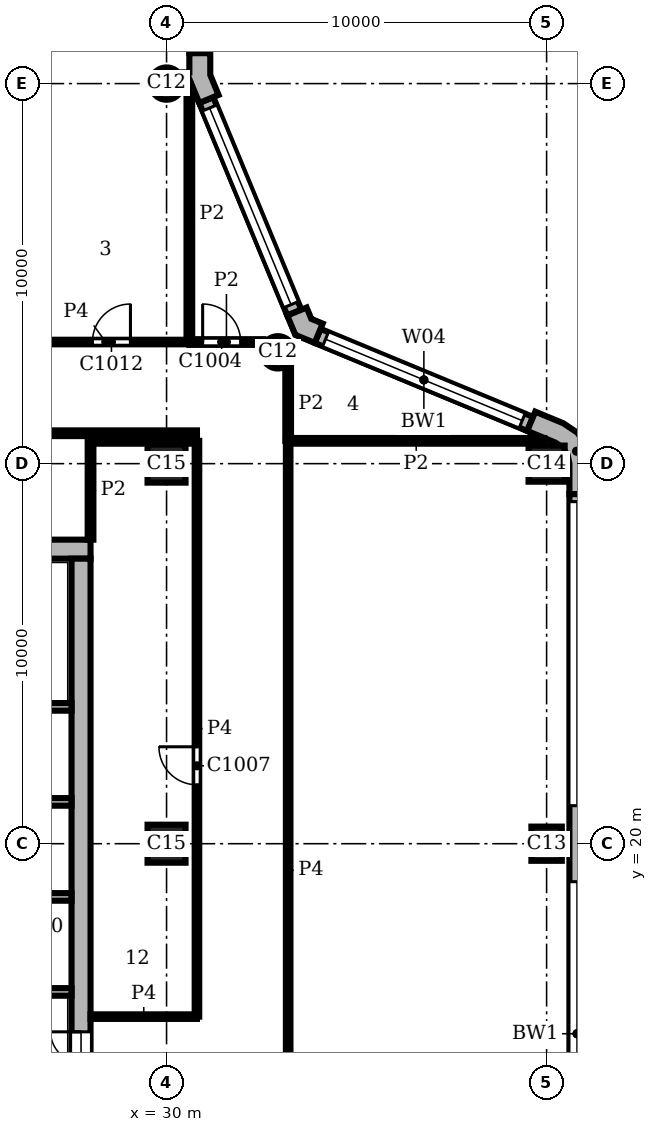
"""IFC4 building model, lengths in metres.
Left out: names, types, materials, properties, quantities, classifications, styles, units other than length and angle.
Written with IfcOpenShell. Run it as: python <this file> out.ifc"""

import sys

from ifc_helpers import new_model, si_unit, direction, frame, frame_2d, origin, origin_2d, place, context, subcontext, project, spatial, polyline, rectangle, circle, outline, extrude, element, fill, save


model = new_model("IFC4")
c1 = context("Model", 3, precision=1e-05, world=origin(), true_north=direction((0.0, 1.0)))
c2 = subcontext(c1, "Body", "Model", "MODEL_VIEW")
j1 = project(units=[si_unit("LENGTHUNIT", "METRE"), si_unit("PLANEANGLEUNIT", "RADIAN")], contexts=[c1])
p1 = place(None, origin())
s1 = spatial("IfcSite", under=j1, at=p1, CompositionType="ELEMENT")
p2 = place(p1, origin())
s2 = spatial("IfcBuilding", under=s1, at=p2, CompositionType="ELEMENT")
p3 = place(p2, frame((0.0, 0.0, 341.1)))
s3 = spatial("IfcBuildingStorey", under=s2, at=p3, CompositionType="ELEMENT", Elevation=341.1)
p4 = place(p3, frame((40.0, 20.0, 0.0), z_axis=(0.0, 0.0, 1.0), x_axis=(0.0, 1.0, 0.0)))
e1 = element("IfcColumn", 1, at=p4, inside=s3, PredefinedType="COLUMN", context=c2, shape_type="SweptSolid", body=[
    extrude(rectangle(XDim=0.9, YDim=0.8, at=origin_2d()), origin(), (0.0, 0.0, 1.0), 3.9),
])
p5 = place(p3, frame((40.0, 30.0, 0.0), z_axis=(0.0, 0.0, 1.0), x_axis=(1.0, 0.0, 0.0)))
e2 = element("IfcColumn", 2, at=p5, inside=s3, PredefinedType="COLUMN", context=c2, shape_type="SweptSolid", body=[
    extrude(rectangle(XDim=0.95, YDim=0.95, at=origin_2d()), origin(), (0.0, 0.0, 1.0), 3.9),
])
for number, where, z_axis, x_axis in (
    (3, (32.929, 32.929, 0.0), (0.0, 0.0, 1.0), (1.0, 0.0, 0.0)),
    (4, (30.0, 40.0, 0.0), (0.0, 0.0, 1.0), (1.0, 0.0, 0.0)),
):
    element("IfcColumn", number, at=place(p3, frame(where, z_axis=z_axis, x_axis=x_axis)), inside=s3, PredefinedType="COLUMN", context=c2, shape_type="SweptSolid", body=[
        extrude(circle(Radius=0.425, at=origin_2d()), origin(), (0.0, 0.0, 1.0), 3.9),
    ])
for number, where, z_axis, x_axis in (
    (5, (30.0, 20.0, 0.0), (0.0, 0.0, 1.0), (1.0, 0.0, 0.0)),
    (6, (30.0, 30.0, 0.0), (0.0, 0.0, 1.0), (1.0, 0.0, 0.0)),
):
    element("IfcColumn", number, at=place(p3, frame(where, z_axis=z_axis, x_axis=x_axis)), inside=s3, PredefinedType="COLUMN", context=c2, shape_type="SweptSolid", body=[
        extrude(rectangle(XDim=1.0, YDim=1.0, at=origin_2d()), origin(), (0.0, 0.0, 1.0), 3.9),
    ])
p6 = place(p3, frame((27.75, 8.5, 0.0), z_axis=(0.0, 0.0, 1.0), x_axis=(0.0, 1.0, 0.0)))
e7 = element("IfcWall", 7, at=p6, inside=s3, PredefinedType="SHEAR", context=c2, shape_type="SweptSolid", body=[
    extrude(rectangle(XDim=19.0, YDim=0.5, at=frame_2d((9.5, 0.0))), origin(), (0.0, 0.0, 1.0), 3.9),
])
p7 = place(p6, frame((4.95, 0.0, 0.0)))
e8 = element("IfcOpeningElement", 8, at=p7, cuts=e7, PredefinedType="OPENING", context=c2, shape_type="SweptSolid", body=[
    extrude(rectangle(XDim=1.6, YDim=2.1, at=frame_2d((0.8, 1.05))), frame((0.0, 0.26, 0.0), z_axis=(0.0, -1.0, 0.0), x_axis=(1.0, 0.0, 0.0)), (0.0, 0.0, 1.0), 0.52),
])
p8 = place(p3, frame((28.0, 27.75, 0.0), z_axis=(0.0, 0.0, 1.0), x_axis=(-1.0, 0.0, 0.0)))
e9 = element("IfcWall", 9, at=p8, inside=s3, PredefinedType="SHEAR", context=c2, shape_type="SweptSolid", body=[
    extrude(rectangle(XDim=20.0, YDim=0.5, at=frame_2d((10.0, 0.0))), origin(), (0.0, 0.0, 1.0), 3.9),
])
p9 = place(p3, origin())
e10 = element("IfcWall", 10, at=p9, inside=s3, PredefinedType="SOLIDWALL", context=c2, shape_type="SweptSolid", body=[
    extrude(outline(polyline([(41.0, 29.2), (41.15, 29.2), (41.15, 30.0), (41.062, 30.44), (40.813, 30.813), (40.44, 31.062), (39.701, 31.369), (39.644, 31.23), (39.49, 30.861), (40.229, 30.554), (40.424, 30.424), (40.554, 30.229), (40.6, 30.0), (40.6, 29.2), (41.0, 29.2)])), origin(), (0.0, 0.0, 1.0), 3.9),
])
e11 = element("IfcWall", 11, at=p9, inside=s3, PredefinedType="SOLIDWALL", context=c2, shape_type="SweptSolid", body=[
    extrude(outline(polyline([(34.051, 33.547), (34.108, 33.685), (33.809, 33.809), (33.685, 34.108), (33.547, 34.051), (33.177, 33.898), (33.388, 33.388), (33.898, 33.177), (34.051, 33.547)])), origin(), (0.0, 0.0, 1.0), 3.9),
])
e12 = element("IfcWall", 12, at=p9, inside=s3, PredefinedType="SOLIDWALL", context=c2, shape_type="SweptSolid", body=[
    extrude(outline(polyline([(30.62, 39.995), (30.62, 40.071), (30.861, 39.49), (31.23, 39.644), (31.369, 39.701), (31.15, 40.229), (31.15, 40.8), (31.0, 40.8), (30.6, 40.8), (30.6, 40.295), (30.425, 40.295), (30.425, 39.995), (30.62, 39.995)])), origin(), (0.0, 0.0, 1.0), 3.9),
])
p10 = place(p3, frame((40.8, 0.8, 0.0), z_axis=(0.0, 0.0, 1.0), x_axis=(0.0, 1.0, 0.0)))
e13 = element("IfcWall", 13, at=p10, inside=s3, PredefinedType="SOLIDWALL", context=c2, shape_type="SweptSolid", body=[
    extrude(rectangle(XDim=28.4, YDim=0.4, at=frame_2d((14.2, 0.0))), origin(), (0.0, 0.0, 1.0), 3.9),
])
p11 = place(p10, frame((0.2, 0.0, 0.9)))
e14 = element("IfcOpeningElement", 14, at=p11, cuts=e13, PredefinedType="OPENING", context=c2, shape_type="SweptSolid", body=[
    extrude(rectangle(XDim=8.0, YDim=2.35, at=frame_2d((4.0, 1.175))), frame((0.0, 0.21, 0.0), z_axis=(0.0, -1.0, 0.0), x_axis=(1.0, 0.0, 0.0)), (0.0, 0.0, 1.0), 0.42),
])
p12 = place(p10, frame((10.2, 0.0, 0.9)))
e15 = element("IfcOpeningElement", 15, at=p12, cuts=e13, PredefinedType="OPENING", context=c2, shape_type="SweptSolid", body=[
    extrude(rectangle(XDim=8.0, YDim=2.35, at=frame_2d((4.0, 1.175))), frame((0.0, 0.21, 0.0), z_axis=(0.0, -1.0, 0.0), x_axis=(1.0, 0.0, 0.0)), (0.0, 0.0, 1.0), 0.42),
])
p13 = place(p10, frame((20.2, 0.0, 0.9)))
e16 = element("IfcOpeningElement", 16, at=p13, cuts=e13, PredefinedType="OPENING", context=c2, shape_type="SweptSolid", body=[
    extrude(rectangle(XDim=8.0, YDim=2.35, at=frame_2d((4.0, 1.175))), frame((0.0, 0.21, 0.0), z_axis=(0.0, -1.0, 0.0), x_axis=(1.0, 0.0, 0.0)), (0.0, 0.0, 1.0), 0.42),
])
p14 = place(p3, frame((39.567, 31.045, 0.0), z_axis=(0.0, 0.0, 1.0), x_axis=(-0.923891000409, 0.382655745237, 0.0)))
e17 = element("IfcWall", 17, at=p14, inside=s3, PredefinedType="SOLIDWALL", context=c2, shape_type="SweptSolid", body=[
    extrude(rectangle(XDim=6.053, YDim=0.4, at=frame_2d((3.027, 0.0))), origin(), (0.0, 0.0, 1.0), 3.9),
])
p15 = place(p14, frame((0.227, 0.0, 0.9)))
e18 = element("IfcOpeningElement", 18, at=p15, cuts=e17, PredefinedType="OPENING", context=c2, shape_type="SweptSolid", body=[
    extrude(rectangle(XDim=5.6, YDim=2.35, at=frame_2d((2.8, 1.175))), frame((0.0, 0.21, 0.0), z_axis=(0.0, -1.0, 0.0), x_axis=(1.0, 0.0, 0.0)), (0.0, 0.0, 1.0), 0.42),
])
p16 = place(p3, frame((33.362, 33.974, 0.0), z_axis=(0.0, 0.0, 1.0), x_axis=(-0.382655745237, 0.923891000409, 0.0)))
e19 = element("IfcWall", 19, at=p16, inside=s3, PredefinedType="SOLIDWALL", context=c2, shape_type="SweptSolid", body=[
    extrude(rectangle(XDim=6.053, YDim=0.4, at=frame_2d((3.027, 0.0))), origin(), (0.0, 0.0, 1.0), 3.9),
])
p17 = place(p16, frame((0.227, 0.0, 0.9)))
e20 = element("IfcOpeningElement", 20, at=p17, cuts=e19, PredefinedType="OPENING", context=c2, shape_type="SweptSolid", body=[
    extrude(rectangle(XDim=5.6, YDim=2.35, at=frame_2d((2.8, 1.175))), frame((0.0, 0.21, 0.0), z_axis=(0.0, -1.0, 0.0), x_axis=(1.0, 0.0, 0.0)), (0.0, 0.0, 1.0), 0.42),
])
p18 = place(p3, frame((30.8, 40.8, 0.0), z_axis=(0.0, 0.0, 1.0), x_axis=(0.0, 1.0, 0.0)))
e21 = element("IfcWall", 21, at=p18, inside=s3, PredefinedType="SOLIDWALL", context=c2, shape_type="SweptSolid", body=[
    extrude(rectangle(XDim=18.4, YDim=0.4, at=frame_2d((9.2, 0.0))), origin(), (0.0, 0.0, 1.0), 3.9),
])
p19 = place(p18, frame((0.2, 0.0, 0.9)))
e22 = element("IfcOpeningElement", 22, at=p19, cuts=e21, PredefinedType="OPENING", context=c2, shape_type="SweptSolid", body=[
    extrude(rectangle(XDim=8.0, YDim=2.35, at=frame_2d((4.0, 1.175))), frame((0.0, 0.21, 0.0), z_axis=(0.0, -1.0, 0.0), x_axis=(1.0, 0.0, 0.0)), (0.0, 0.0, 1.0), 0.42),
])
p20 = place(p18, frame((10.2, 0.0, 0.9)))
e23 = element("IfcOpeningElement", 23, at=p20, cuts=e21, PredefinedType="OPENING", context=c2, shape_type="SweptSolid", body=[
    extrude(rectangle(XDim=8.0, YDim=2.35, at=frame_2d((4.0, 1.175))), frame((0.0, 0.21, 0.0), z_axis=(0.0, -1.0, 0.0), x_axis=(1.0, 0.0, 0.0)), (0.0, 0.0, 1.0), 0.42),
])
for number, where, z_axis, x_axis in (
    (24, (24.3, 16.1, 0.0), (0.0, 0.0, 1.0), (1.0, 0.0, 0.0)),
    (25, (24.3, 18.6, 0.0), (0.0, 0.0, 1.0), (1.0, 0.0, 0.0)),
    (26, (24.3, 21.1, 0.0), (0.0, 0.0, 1.0), (1.0, 0.0, 0.0)),
):
    element("IfcWall", number, at=place(p3, frame(where, z_axis=z_axis, x_axis=x_axis)), inside=s3, PredefinedType="SHEAR", context=c2, shape_type="SweptSolid", body=[
        extrude(rectangle(XDim=3.2, YDim=0.2, at=frame_2d((1.6, 0.0))), origin(), (0.0, 0.0, 1.0), 3.58),
    ])
p21 = place(p3, frame((13.8, 23.6, 0.0), z_axis=(0.0, 0.0, 1.0), x_axis=(1.0, 0.0, 0.0)))
e27 = element("IfcWall", 27, at=p21, inside=s3, PredefinedType="SHEAR", context=c2, shape_type="SweptSolid", body=[
    extrude(rectangle(XDim=13.7, YDim=0.2, at=frame_2d((6.85, 0.0))), origin(), (0.0, 0.0, 1.0), 3.58),
])
p22 = place(p21, frame((2.4, 0.0, 0.0)))
e28 = element("IfcOpeningElement", 28, at=p22, cuts=e27, PredefinedType="OPENING", context=c2, shape_type="SweptSolid", body=[
    extrude(rectangle(XDim=1.1, YDim=2.1, at=frame_2d((0.55, 1.05))), frame((0.0, 0.11, 0.0), z_axis=(0.0, -1.0, 0.0), x_axis=(1.0, 0.0, 0.0)), (0.0, 0.0, 1.0), 0.22),
])
p23 = place(p21, frame((4.9, 0.0, 0.0)))
e29 = element("IfcOpeningElement", 29, at=p23, cuts=e27, PredefinedType="OPENING", context=c2, shape_type="SweptSolid", body=[
    extrude(rectangle(XDim=1.1, YDim=2.1, at=frame_2d((0.55, 1.05))), frame((0.0, 0.11, 0.0), z_axis=(0.0, -1.0, 0.0), x_axis=(1.0, 0.0, 0.0)), (0.0, 0.0, 1.0), 0.22),
])
p24 = place(p21, frame((0.15, 0.0, 0.0)))
e30 = element("IfcOpeningElement", 30, at=p24, cuts=e27, PredefinedType="OPENING", context=c2, shape_type="SweptSolid", body=[
    extrude(rectangle(XDim=1.0, YDim=2.1, at=frame_2d((0.5, 1.05))), frame((0.0, 0.11, 0.0), z_axis=(0.0, -1.0, 0.0), x_axis=(1.0, 0.0, 0.0)), (0.0, 0.0, 1.0), 0.22),
])
p25 = place(p3, frame((28.0, 28.0, 0.0), z_axis=(0.0, 0.0, 1.0), x_axis=(0.0, 1.0, 0.0)))
e31 = element("IfcWall", 31, at=p25, inside=s3, PredefinedType="PARTITIONING", context=c2, shape_type="SweptSolid", body=[
    extrude(rectangle(XDim=2.598, YDim=0.15, at=frame_2d((1.299, 0.0))), origin(), (0.0, 0.0, 1.0), 3.58),
])
p26 = place(p3, frame((30.6, 33.2, 0.0), z_axis=(0.0, 0.0, 1.0), x_axis=(0.0, 1.0, 0.0)))
e32 = element("IfcWall", 32, at=p26, inside=s3, PredefinedType="PARTITIONING", context=c2, shape_type="SweptSolid", body=[
    extrude(rectangle(XDim=6.738, YDim=0.15, at=frame_2d((3.369, 0.0))), origin(), (0.0, 0.0, 1.0), 3.58),
])
p27 = place(p3, frame((33.2, 30.6, 0.0), z_axis=(0.0, 0.0, 1.0), x_axis=(0.0, 1.0, 0.0)))
e33 = element("IfcWall", 33, at=p27, inside=s3, PredefinedType="PARTITIONING", context=c2, shape_type="SweptSolid", body=[
    extrude(rectangle(XDim=1.952, YDim=0.15, at=frame_2d((0.976, 0.0))), origin(), (0.0, 0.0, 1.0), 3.58),
])
p28 = place(p3, frame((28.002, 30.6, 0.0), z_axis=(0.0, 0.0, 1.0), x_axis=(1.0, 0.0, 0.0)))
e34 = element("IfcWall", 34, at=p28, inside=s3, PredefinedType="PARTITIONING", context=c2, shape_type="SweptSolid", body=[
    extrude(rectangle(XDim=2.798, YDim=0.15, at=frame_2d((1.399, 0.0))), origin(), (0.0, 0.0, 1.0), 3.58),
])
p29 = place(p3, frame((33.2, 30.6, 0.0), z_axis=(0.0, 0.0, 1.0), x_axis=(1.0, 0.0, 0.0)))
e35 = element("IfcWall", 35, at=p29, inside=s3, PredefinedType="PARTITIONING", context=c2, shape_type="SweptSolid", body=[
    extrude(rectangle(XDim=6.738, YDim=0.15, at=frame_2d((3.369, 0.0))), origin(), (0.0, 0.0, 1.0), 3.58),
])
p30 = place(p3, frame((13.802, 30.8, 0.0), z_axis=(0.0, 0.0, 1.0), x_axis=(1.0, 0.0, 0.0)))
e36 = element("IfcWall", 36, at=p30, inside=s3, PredefinedType="PARTITIONING", context=c2, shape_type="SweptSolid", body=[
    extrude(rectangle(XDim=16.998, YDim=0.15, at=frame_2d((8.499, 0.0))), origin(), (0.0, 0.0, 1.0), 3.58),
])
p31 = place(p30, frame((9.35, 0.0, 0.0)))
e37 = element("IfcOpeningElement", 37, at=p31, cuts=e36, PredefinedType="OPENING", context=c2, shape_type="SweptSolid", body=[
    extrude(rectangle(XDim=1.0, YDim=2.1, at=frame_2d((0.5, 1.05))), frame((0.0, 0.085, 0.0), z_axis=(0.0, -1.0, 0.0), x_axis=(1.0, 0.0, 0.0)), (0.0, 0.0, 1.0), 0.17),
])
p32 = place(p3, frame((30.6, 33.2, 0.0), z_axis=(0.0, 0.0, 1.0), x_axis=(1.0, 0.0, 0.0)))
e38 = element("IfcWall", 38, at=p32, inside=s3, PredefinedType="PARTITIONING", context=c2, shape_type="SweptSolid", body=[
    extrude(rectangle(XDim=1.952, YDim=0.15, at=frame_2d((0.976, 0.0))), origin(), (0.0, 0.0, 1.0), 3.58),
])
p33 = place(p32, frame((0.35, 0.0, 0.0)))
e39 = element("IfcOpeningElement", 39, at=p33, cuts=e38, PredefinedType="OPENING", context=c2, shape_type="SweptSolid", body=[
    extrude(rectangle(XDim=1.0, YDim=2.1, at=frame_2d((0.5, 1.05))), frame((0.0, 0.085, 0.0), z_axis=(0.0, -1.0, 0.0), x_axis=(1.0, 0.0, 0.0)), (0.0, 0.0, 1.0), 0.17),
])
p34 = place(p3, frame((30.8, 15.45, 0.0), z_axis=(0.0, 0.0, 1.0), x_axis=(0.0, 1.0, 0.0)))
e40 = element("IfcWall", 40, at=p34, inside=s3, PredefinedType="PARTITIONING", context=c2, shape_type="SweptSolid", body=[
    extrude(rectangle(XDim=15.15, YDim=0.12, at=frame_2d((7.575, 0.0))), origin(), (0.0, 0.0, 1.0), 3.58),
])
p35 = place(p34, frame((6.1, 0.0, 0.0)))
e41 = element("IfcOpeningElement", 41, at=p35, cuts=e40, PredefinedType="OPENING", context=c2, shape_type="SweptSolid", body=[
    extrude(rectangle(XDim=1.0, YDim=2.1, at=frame_2d((0.5, 1.05))), frame((0.0, 0.07, 0.0), z_axis=(0.0, -1.0, 0.0), x_axis=(1.0, 0.0, 0.0)), (0.0, 0.0, 1.0), 0.14),
])
p36 = place(p3, frame((33.2, 8.0, 0.0), z_axis=(0.0, 0.0, 1.0), x_axis=(0.0, 1.0, 0.0)))
e42 = element("IfcWall", 42, at=p36, inside=s3, PredefinedType="PARTITIONING", context=c2, shape_type="SweptSolid", body=[
    extrude(rectangle(XDim=22.6, YDim=0.12, at=frame_2d((11.3, 0.0))), origin(), (0.0, 0.0, 1.0), 3.58),
])
p37 = place(p3, frame((28.0, 15.45, 0.0), z_axis=(0.0, 0.0, 1.0), x_axis=(1.0, 0.0, 0.0)))
e43 = element("IfcWall", 43, at=p37, inside=s3, PredefinedType="PARTITIONING", context=c2, shape_type="SweptSolid", body=[
    extrude(rectangle(XDim=2.8, YDim=0.12, at=frame_2d((1.4, 0.0))), origin(), (0.0, 0.0, 1.0), 3.58),
])
p38 = place(p3, frame((26.2, 33.2, 0.0), z_axis=(0.0, 0.0, 1.0), x_axis=(1.0, 0.0, 0.0)))
e44 = element("IfcWall", 44, at=p38, inside=s3, PredefinedType="PARTITIONING", context=c2, shape_type="SweptSolid", body=[
    extrude(rectangle(XDim=4.4, YDim=0.12, at=frame_2d((2.2, 0.0))), origin(), (0.0, 0.0, 1.0), 3.58),
])
p39 = place(p38, frame((1.85, 0.0, 0.0)))
e45 = element("IfcOpeningElement", 45, at=p39, cuts=e44, PredefinedType="OPENING", context=c2, shape_type="SweptSolid", body=[
    extrude(rectangle(XDim=1.0, YDim=2.1, at=frame_2d((0.5, 1.05))), frame((0.0, 0.07, 0.0), z_axis=(0.0, -1.0, 0.0), x_axis=(1.0, 0.0, 0.0)), (0.0, 0.0, 1.0), 0.14),
])
p40 = place(p12, origin())
e46 = element("IfcWindow", 46, at=p40, inside=s3, PartitioningType="SINGLE_PANEL", PredefinedType="WINDOW", context=c2, shape_type="SweptSolid", body=[
    extrude(rectangle(XDim=8.0, YDim=2.35, at=frame_2d((4.0, 1.175))), frame((0.0, 0.16, 0.0), z_axis=(0.0, -1.0, 0.0), x_axis=(1.0, 0.0, 0.0)), (0.0, 0.0, 1.0), 0.06),
])
fill(e15, e46)
p41 = place(p13, origin())
e47 = element("IfcWindow", 47, at=p41, inside=s3, PartitioningType="SINGLE_PANEL", PredefinedType="WINDOW", context=c2, shape_type="SweptSolid", body=[
    extrude(rectangle(XDim=8.0, YDim=2.35, at=frame_2d((4.0, 1.175))), frame((0.0, 0.16, 0.0), z_axis=(0.0, -1.0, 0.0), x_axis=(1.0, 0.0, 0.0)), (0.0, 0.0, 1.0), 0.06),
])
fill(e16, e47)
p42 = place(p15, origin())
e48 = element("IfcWindow", 48, at=p42, inside=s3, PartitioningType="SINGLE_PANEL", PredefinedType="WINDOW", context=c2, shape_type="SweptSolid", body=[
    extrude(rectangle(XDim=5.6, YDim=2.35, at=frame_2d((2.8, 1.175))), frame((0.0, 0.16, 0.0), z_axis=(0.0, -1.0, 0.0), x_axis=(1.0, 0.0, 0.0)), (0.0, 0.0, 1.0), 0.06),
])
fill(e18, e48)
p43 = place(p17, origin())
e49 = element("IfcWindow", 49, at=p43, inside=s3, PartitioningType="SINGLE_PANEL", PredefinedType="WINDOW", context=c2, shape_type="SweptSolid", body=[
    extrude(rectangle(XDim=5.6, YDim=2.35, at=frame_2d((2.8, 1.175))), frame((0.0, 0.16, 0.0), z_axis=(0.0, -1.0, 0.0), x_axis=(1.0, 0.0, 0.0)), (0.0, 0.0, 1.0), 0.06),
])
fill(e20, e49)
p44 = place(p7, origin())
e50 = element("IfcDoor", 50, at=p44, inside=s3, OperationType="DOUBLE_DOOR_SINGLE_SWING", PredefinedType="DOOR", context=c2, shape_type="SweptSolid", body=[
    extrude(rectangle(XDim=1.6, YDim=2.1, at=frame_2d((0.8, 1.05))), frame((0.0, 0.025, 0.0), z_axis=(0.0, -1.0, 0.0), x_axis=(1.0, 0.0, 0.0)), (0.0, 0.0, 1.0), 0.05),
])
fill(e8, e50)
p45 = place(p33, origin())
e51 = element("IfcDoor", 51, at=p45, inside=s3, OperationType="SINGLE_SWING_LEFT", PredefinedType="DOOR", context=c2, shape_type="SweptSolid", body=[
    extrude(rectangle(XDim=1.0, YDim=2.1, at=frame_2d((0.5, 1.05))), frame((0.0, 0.025, 0.0), z_axis=(0.0, -1.0, 0.0), x_axis=(1.0, 0.0, 0.0)), (0.0, 0.0, 1.0), 0.05),
])
fill(e39, e51)
p46 = place(p35, origin())
e52 = element("IfcDoor", 52, at=p46, inside=s3, OperationType="SINGLE_SWING_RIGHT", PredefinedType="DOOR", context=c2, shape_type="SweptSolid", body=[
    extrude(rectangle(XDim=1.0, YDim=2.1, at=frame_2d((0.5, 1.05))), frame((0.0, 0.025, 0.0), z_axis=(0.0, -1.0, 0.0), x_axis=(1.0, 0.0, 0.0)), (0.0, 0.0, 1.0), 0.05),
])
fill(e41, e52)
p47 = place(p39, origin())
e53 = element("IfcDoor", 53, at=p47, inside=s3, OperationType="SINGLE_SWING_RIGHT", PredefinedType="DOOR", context=c2, shape_type="SweptSolid", body=[
    extrude(rectangle(XDim=1.0, YDim=2.1, at=frame_2d((0.5, 1.05))), frame((0.0, 0.025, 0.0), z_axis=(0.0, -1.0, 0.0), x_axis=(1.0, 0.0, 0.0)), (0.0, 0.0, 1.0), 0.05),
])
fill(e45, e53)
save(model, sys.argv[1])
